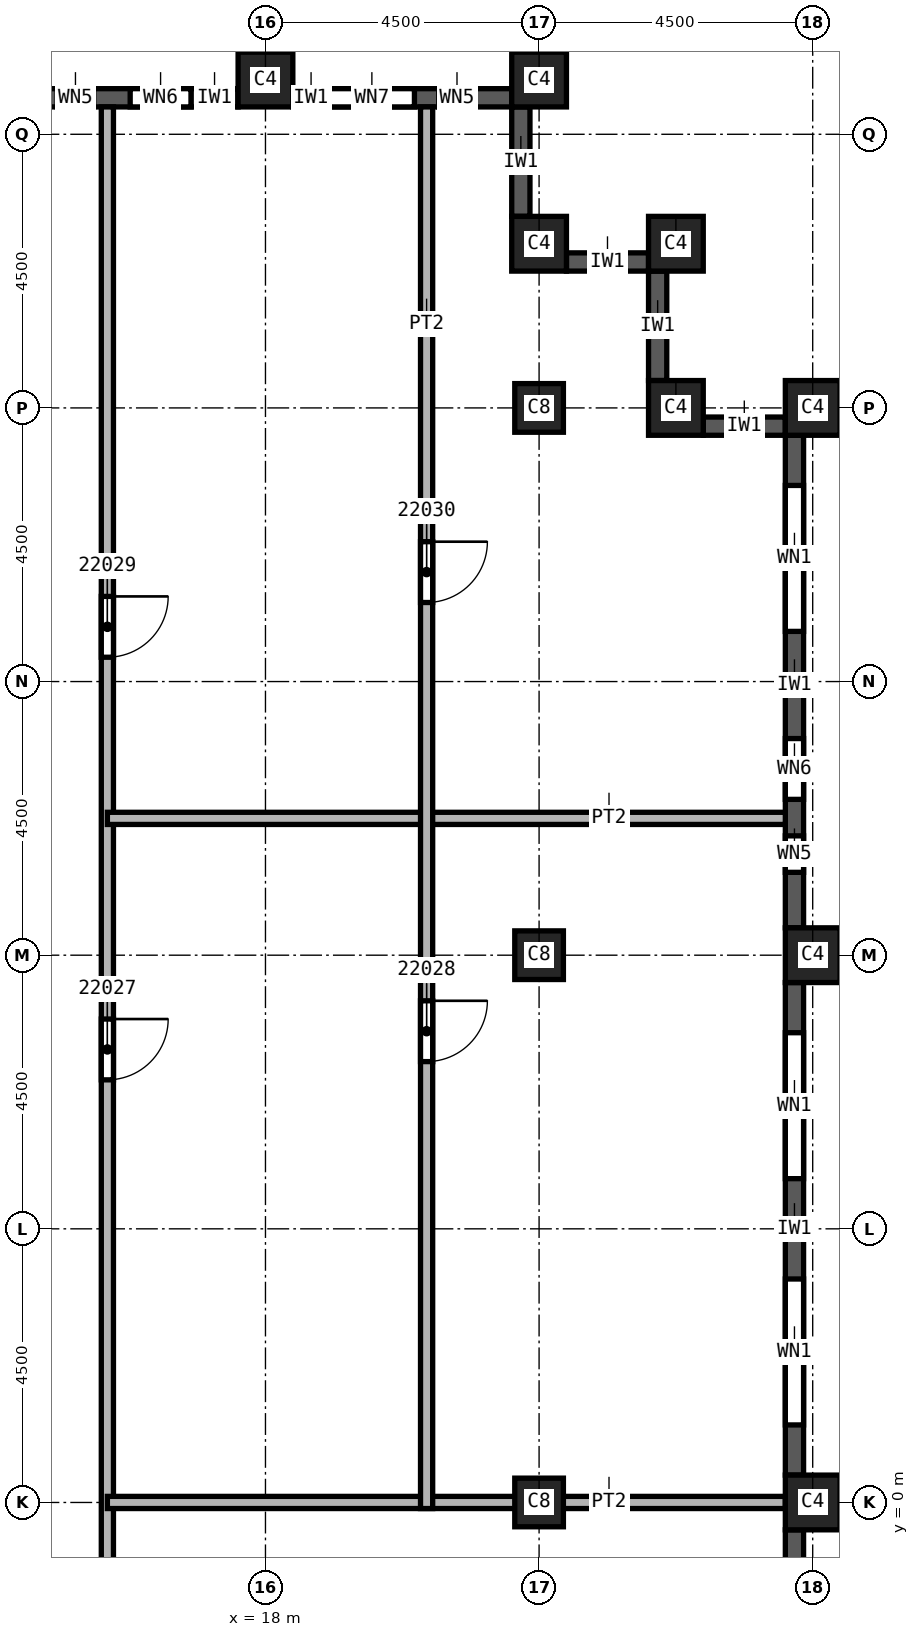
"""IFC4 building model, lengths in metres.
Left out: names, types, materials, properties, quantities, classifications, styles, units other than length and angle.
Written with IfcOpenShell. Run it as: python <this file> out.ifc"""

import sys

from ifc_helpers import new_model, si_unit, direction, frame, frame_2d, origin, origin_2d, place, context, subcontext, project, spatial, rectangle, extrude, element, fill, save


model = new_model("IFC4")
c1 = context("Model", 3, precision=1e-05, world=origin(), true_north=direction((0.0, 1.0)))
c2 = subcontext(c1, "Body", "Model", "MODEL_VIEW")
j1 = project(units=[si_unit("LENGTHUNIT", "METRE"), si_unit("PLANEANGLEUNIT", "RADIAN")], contexts=[c1])
p1 = place(None, origin())
s1 = spatial("IfcSite", under=j1, at=p1, CompositionType="ELEMENT")
p2 = place(p1, origin())
s2 = spatial("IfcBuilding", under=s1, at=p2, CompositionType="ELEMENT")
p3 = place(p2, frame((0.0, 0.0, 316.0)))
s3 = spatial("IfcBuildingStorey", under=s2, at=p3, CompositionType="ELEMENT", Elevation=316.0)
for number, where, z_axis, x_axis in (
    (1, (22.5, 0.0, 0.0), (0.0, 0.0, 1.0), (1.0, 0.0, 0.0)),
    (2, (22.5, 9.0, 0.0), (0.0, 0.0, 1.0), (1.0, 0.0, 0.0)),
    (3, (22.5, 18.0, 0.0), (0.0, 0.0, 1.0), (1.0, 0.0, 0.0)),
):
    element("IfcColumn", number, at=place(p3, frame(where, z_axis=z_axis, x_axis=x_axis)), inside=s3, PredefinedType="COLUMN", context=c2, shape_type="SweptSolid", body=[
        extrude(rectangle(XDim=0.8, YDim=0.8, at=origin_2d()), origin(), (0.0, 0.0, 1.0), 3.59),
    ])
for number, where, z_axis, x_axis in (
    (4, (27.0, 0.0, 0.0), (0.0, 0.0, 1.0), (0.0, 1.0, 0.0)),
    (5, (27.0, 9.0, 0.0), (0.0, 0.0, 1.0), (0.0, 1.0, 0.0)),
    (6, (27.0, 18.0, 0.0), (0.0, 0.0, 1.0), (0.0, 1.0, 0.0)),
    (7, (18.0, 23.4, 0.0), (0.0, 0.0, 1.0), (1.0, 0.0, 0.0)),
    (8, (22.5, 23.4, 0.0), (0.0, 0.0, 1.0), (1.0, 0.0, 0.0)),
    (9, (22.5, 20.7, 0.0), (0.0, 0.0, 1.0), (1.0, 0.0, 0.0)),
    (10, (24.75, 20.7, 0.0), (0.0, 0.0, 1.0), (1.0, 0.0, 0.0)),
    (11, (24.75, 18.0, 0.0), (0.0, 0.0, 1.0), (1.0, 0.0, 0.0)),
):
    element("IfcColumn", number, at=place(p3, frame(where, z_axis=z_axis, x_axis=x_axis)), inside=s3, PredefinedType="COLUMN", context=c2, shape_type="SweptSolid", body=[
        extrude(rectangle(XDim=0.9, YDim=0.9, at=origin_2d()), origin(), (0.0, 0.0, 1.0), 3.59),
    ])
p4 = place(p3, frame((26.7, -8.55, 0.0), z_axis=(0.0, 0.0, 1.0), x_axis=(0.0, 1.0, 0.0)))
e12 = element("IfcWall", 12, at=p4, inside=s3, PredefinedType="SOLIDWALL", context=c2, shape_type="SweptSolid", body=[
    extrude(rectangle(XDim=8.1, YDim=0.3, at=frame_2d((4.05, 0.0))), origin(), (0.0, 0.0, 1.0), 2.99),
])
p5 = place(p4, frame((0.825, 0.0, 0.8)))
e13 = element("IfcOpeningElement", 13, at=p5, cuts=e12, PredefinedType="OPENING", context=c2, shape_type="SweptSolid", body=[
    extrude(rectangle(XDim=2.4, YDim=1.95, at=frame_2d((1.2, 0.975))), frame((0.0, 0.15, 0.0), z_axis=(0.0, -1.0, 0.0), x_axis=(1.0, 0.0, 0.0)), (0.0, 0.0, 1.0), 0.3),
])
p6 = place(p4, frame((4.875, 0.0, 0.8)))
e14 = element("IfcOpeningElement", 14, at=p6, cuts=e12, PredefinedType="OPENING", context=c2, shape_type="SweptSolid", body=[
    extrude(rectangle(XDim=2.4, YDim=1.95, at=frame_2d((1.2, 0.975))), frame((0.0, 0.15, 0.0), z_axis=(0.0, -1.0, 0.0), x_axis=(1.0, 0.0, 0.0)), (0.0, 0.0, 1.0), 0.3),
])
p7 = place(p3, frame((26.7, 0.45, 0.0), z_axis=(0.0, 0.0, 1.0), x_axis=(0.0, 1.0, 0.0)))
e15 = element("IfcWall", 15, at=p7, inside=s3, PredefinedType="SOLIDWALL", context=c2, shape_type="SweptSolid", body=[
    extrude(rectangle(XDim=8.1, YDim=0.3, at=frame_2d((4.05, 0.0))), origin(), (0.0, 0.0, 1.0), 2.99),
])
p8 = place(p7, frame((0.825, 0.0, 0.8)))
e16 = element("IfcOpeningElement", 16, at=p8, cuts=e15, PredefinedType="OPENING", context=c2, shape_type="SweptSolid", body=[
    extrude(rectangle(XDim=2.4, YDim=1.95, at=frame_2d((1.2, 0.975))), frame((0.0, 0.15, 0.0), z_axis=(0.0, -1.0, 0.0), x_axis=(1.0, 0.0, 0.0)), (0.0, 0.0, 1.0), 0.3),
])
p9 = place(p7, frame((4.875, 0.0, 0.8)))
e17 = element("IfcOpeningElement", 17, at=p9, cuts=e15, PredefinedType="OPENING", context=c2, shape_type="SweptSolid", body=[
    extrude(rectangle(XDim=2.4, YDim=1.95, at=frame_2d((1.2, 0.975))), frame((0.0, 0.15, 0.0), z_axis=(0.0, -1.0, 0.0), x_axis=(1.0, 0.0, 0.0)), (0.0, 0.0, 1.0), 0.3),
])
p10 = place(p3, frame((26.7, 9.45, 0.0), z_axis=(0.0, 0.0, 1.0), x_axis=(0.0, 1.0, 0.0)))
e18 = element("IfcWall", 18, at=p10, inside=s3, PredefinedType="SOLIDWALL", context=c2, shape_type="SweptSolid", body=[
    extrude(rectangle(XDim=8.1, YDim=0.3, at=frame_2d((4.05, 0.0))), origin(), (0.0, 0.0, 1.0), 2.99),
])
p11 = place(p10, frame((4.875, 0.0, 0.8)))
e19 = element("IfcOpeningElement", 19, at=p11, cuts=e18, PredefinedType="OPENING", context=c2, shape_type="SweptSolid", body=[
    extrude(rectangle(XDim=2.4, YDim=1.95, at=frame_2d((1.2, 0.975))), frame((0.0, 0.15, 0.0), z_axis=(0.0, -1.0, 0.0), x_axis=(1.0, 0.0, 0.0)), (0.0, 0.0, 1.0), 0.3),
])
p12 = place(p10, frame((0.913, 0.0, 0.8)))
e20 = element("IfcOpeningElement", 20, at=p12, cuts=e18, PredefinedType="OPENING", context=c2, shape_type="SweptSolid", body=[
    extrude(rectangle(XDim=0.6, YDim=1.95, at=frame_2d((0.3, 0.975))), frame((0.0, 0.15, 0.0), z_axis=(0.0, -1.0, 0.0), x_axis=(1.0, 0.0, 0.0)), (0.0, 0.0, 1.0), 0.3),
])
p13 = place(p10, frame((2.113, 0.0, 0.8)))
e21 = element("IfcOpeningElement", 21, at=p13, cuts=e18, PredefinedType="OPENING", context=c2, shape_type="SweptSolid", body=[
    extrude(rectangle(XDim=1.0, YDim=1.95, at=frame_2d((0.5, 0.975))), frame((0.0, 0.15, 0.0), z_axis=(0.0, -1.0, 0.0), x_axis=(1.0, 0.0, 0.0)), (0.0, 0.0, 1.0), 0.3),
])
p14 = place(p3, frame((26.55, 17.7, 0.0), z_axis=(0.0, 0.0, 1.0), x_axis=(-1.0, 0.0, 0.0)))
e22 = element("IfcWall", 22, at=p14, inside=s3, PredefinedType="SOLIDWALL", context=c2, shape_type="SweptSolid", body=[
    extrude(rectangle(XDim=1.35, YDim=0.3, at=frame_2d((0.675, 0.0))), origin(), (0.0, 0.0, 1.0), 2.99),
])
p15 = place(p3, frame((24.45, 18.45, 0.0), z_axis=(0.0, 0.0, 1.0), x_axis=(0.0, 1.0, 0.0)))
e23 = element("IfcWall", 23, at=p15, inside=s3, PredefinedType="SOLIDWALL", context=c2, shape_type="SweptSolid", body=[
    extrude(rectangle(XDim=1.8, YDim=0.3, at=frame_2d((0.9, 0.0))), origin(), (0.0, 0.0, 1.0), 2.99),
])
p16 = place(p3, frame((24.3, 20.4, 0.0), z_axis=(0.0, 0.0, 1.0), x_axis=(-1.0, 0.0, 0.0)))
e24 = element("IfcWall", 24, at=p16, inside=s3, PredefinedType="SOLIDWALL", context=c2, shape_type="SweptSolid", body=[
    extrude(rectangle(XDim=1.35, YDim=0.3, at=frame_2d((0.675, 0.0))), origin(), (0.0, 0.0, 1.0), 2.99),
])
p17 = place(p3, frame((22.2, 21.15, 0.0), z_axis=(0.0, 0.0, 1.0), x_axis=(0.0, 1.0, 0.0)))
e25 = element("IfcWall", 25, at=p17, inside=s3, PredefinedType="SOLIDWALL", context=c2, shape_type="SweptSolid", body=[
    extrude(rectangle(XDim=1.8, YDim=0.3, at=frame_2d((0.9, 0.0))), origin(), (0.0, 0.0, 1.0), 2.99),
])
p18 = place(p3, frame((22.05, 23.1, 0.0), z_axis=(0.0, 0.0, 1.0), x_axis=(-1.0, 0.0, 0.0)))
e26 = element("IfcWall", 26, at=p18, inside=s3, PredefinedType="SOLIDWALL", context=c2, shape_type="SweptSolid", body=[
    extrude(rectangle(XDim=3.6, YDim=0.3, at=frame_2d((1.8, 0.0))), origin(), (0.0, 0.0, 1.0), 2.99),
])
p19 = place(p18, frame((0.6, 0.0, 0.8)))
e27 = element("IfcOpeningElement", 27, at=p19, cuts=e26, PredefinedType="OPENING", context=c2, shape_type="SweptSolid", body=[
    extrude(rectangle(XDim=0.6, YDim=1.95, at=frame_2d((0.3, 0.975))), frame((0.0, 0.15, 0.0), z_axis=(0.0, -1.0, 0.0), x_axis=(1.0, 0.0, 0.0)), (0.0, 0.0, 1.0), 0.3),
])
p20 = place(p18, frame((1.6, 0.0, 0.8)))
e28 = element("IfcOpeningElement", 28, at=p20, cuts=e26, PredefinedType="OPENING", context=c2, shape_type="SweptSolid", body=[
    extrude(rectangle(XDim=1.4, YDim=1.95, at=frame_2d((0.7, 0.975))), frame((0.0, 0.15, 0.0), z_axis=(0.0, -1.0, 0.0), x_axis=(1.0, 0.0, 0.0)), (0.0, 0.0, 1.0), 0.3),
])
p21 = place(p3, frame((17.55, 23.1, 0.0), z_axis=(0.0, 0.0, 1.0), x_axis=(-1.0, 0.0, 0.0)))
e29 = element("IfcWall", 29, at=p21, inside=s3, PredefinedType="SOLIDWALL", context=c2, shape_type="SweptSolid", body=[
    extrude(rectangle(XDim=3.6, YDim=0.3, at=frame_2d((1.8, 0.0))), origin(), (0.0, 0.0, 1.0), 2.99),
])
p22 = place(p21, frame((0.775, 0.0, 0.8)))
e30 = element("IfcOpeningElement", 30, at=p22, cuts=e29, PredefinedType="OPENING", context=c2, shape_type="SweptSolid", body=[
    extrude(rectangle(XDim=1.0, YDim=1.95, at=frame_2d((0.5, 0.975))), frame((0.0, 0.15, 0.0), z_axis=(0.0, -1.0, 0.0), x_axis=(1.0, 0.0, 0.0)), (0.0, 0.0, 1.0), 0.3),
])
p23 = place(p21, frame((2.375, 0.0, 0.8)))
e31 = element("IfcOpeningElement", 31, at=p23, cuts=e29, PredefinedType="OPENING", context=c2, shape_type="SweptSolid", body=[
    extrude(rectangle(XDim=0.6, YDim=1.95, at=frame_2d((0.3, 0.975))), frame((0.0, 0.15, 0.0), z_axis=(0.0, -1.0, 0.0), x_axis=(1.0, 0.0, 0.0)), (0.0, 0.0, 1.0), 0.3),
])
p24 = place(p3, frame((15.4, 22.95, 0.0), z_axis=(0.0, 0.0, 1.0), x_axis=(0.0, -1.0, 0.0)))
e32 = element("IfcWall", 32, at=p24, inside=s3, PredefinedType="PARTITIONING", context=c2, shape_type="SweptSolid", body=[
    extrude(rectangle(XDim=45.9, YDim=0.2, at=frame_2d((22.95, 0.0))), origin(), (0.0, 0.0, 1.0), 3.59),
])
p25 = place(p24, frame((15.0, 0.0, 0.0)))
e33 = element("IfcOpeningElement", 33, at=p25, cuts=e32, PredefinedType="OPENING", context=c2, shape_type="SweptSolid", body=[
    extrude(rectangle(XDim=1.0, YDim=2.1, at=frame_2d((0.5, 1.05))), frame((0.0, 0.1, 0.0), z_axis=(0.0, -1.0, 0.0), x_axis=(1.0, 0.0, 0.0)), (0.0, 0.0, 1.0), 0.2),
])
p26 = place(p24, frame((8.05, 0.0, 0.0)))
e34 = element("IfcOpeningElement", 34, at=p26, cuts=e32, PredefinedType="OPENING", context=c2, shape_type="SweptSolid", body=[
    extrude(rectangle(XDim=1.0, YDim=2.1, at=frame_2d((0.5, 1.05))), frame((0.0, 0.1, 0.0), z_axis=(0.0, -1.0, 0.0), x_axis=(1.0, 0.0, 0.0)), (0.0, 0.0, 1.0), 0.2),
])
p27 = place(p24, frame((43.8, 0.0, 0.0)))
e35 = element("IfcOpeningElement", 35, at=p27, cuts=e32, PredefinedType="OPENING", context=c2, shape_type="SweptSolid", body=[
    extrude(rectangle(XDim=1.0, YDim=2.1, at=frame_2d((0.5, 1.05))), frame((0.0, 0.1, 0.0), z_axis=(0.0, -1.0, 0.0), x_axis=(1.0, 0.0, 0.0)), (0.0, 0.0, 1.0), 0.2),
])
p28 = place(p24, frame((30.3, 0.0, 0.0)))
e36 = element("IfcOpeningElement", 36, at=p28, cuts=e32, PredefinedType="OPENING", context=c2, shape_type="SweptSolid", body=[
    extrude(rectangle(XDim=1.0, YDim=2.1, at=frame_2d((0.5, 1.05))), frame((0.0, 0.1, 0.0), z_axis=(0.0, -1.0, 0.0), x_axis=(1.0, 0.0, 0.0)), (0.0, 0.0, 1.0), 0.2),
])
for number, where, z_axis, x_axis in (
    (37, (15.4, 11.25, 0.0), (0.0, 0.0, 1.0), (1.0, 0.0, 0.0)),
    (38, (26.55, 0.0, 0.0), (0.0, 0.0, 1.0), (-1.0, 0.0, 0.0)),
):
    element("IfcWall", number, at=place(p3, frame(where, z_axis=z_axis, x_axis=x_axis)), inside=s3, PredefinedType="PARTITIONING", context=c2, shape_type="SweptSolid", body=[
        extrude(rectangle(XDim=11.15, YDim=0.2, at=frame_2d((5.575, 0.0))), origin(), (0.0, 0.0, 1.0), 3.59),
    ])
p29 = place(p3, frame((20.65, 22.95, 0.0), z_axis=(0.0, 0.0, 1.0), x_axis=(0.0, -1.0, 0.0)))
e39 = element("IfcWall", 39, at=p29, inside=s3, PredefinedType="PARTITIONING", context=c2, shape_type="SweptSolid", body=[
    extrude(rectangle(XDim=23.05, YDim=0.2, at=frame_2d((11.525, 0.0))), origin(), (0.0, 0.0, 1.0), 3.59),
])
p30 = place(p29, frame((14.7, 0.0, 0.0)))
e40 = element("IfcOpeningElement", 40, at=p30, cuts=e39, PredefinedType="OPENING", context=c2, shape_type="SweptSolid", body=[
    extrude(rectangle(XDim=1.0, YDim=2.1, at=frame_2d((0.5, 1.05))), frame((0.0, 0.1, 0.0), z_axis=(0.0, -1.0, 0.0), x_axis=(1.0, 0.0, 0.0)), (0.0, 0.0, 1.0), 0.2),
])
p31 = place(p29, frame((7.15, 0.0, 0.0)))
e41 = element("IfcOpeningElement", 41, at=p31, cuts=e39, PredefinedType="OPENING", context=c2, shape_type="SweptSolid", body=[
    extrude(rectangle(XDim=1.0, YDim=2.1, at=frame_2d((0.5, 1.05))), frame((0.0, 0.1, 0.0), z_axis=(0.0, -1.0, 0.0), x_axis=(1.0, 0.0, 0.0)), (0.0, 0.0, 1.0), 0.2),
])
p32 = place(p8, origin())
e42 = element("IfcWindow", 42, at=p32, inside=s3, PartitioningType="SINGLE_PANEL", PredefinedType="WINDOW", context=c2, shape_type="SweptSolid", body=[
    extrude(rectangle(XDim=2.4, YDim=1.95, at=frame_2d((1.2, 0.975))), frame((0.0, 0.03, 0.0), z_axis=(0.0, -1.0, 0.0), x_axis=(1.0, 0.0, 0.0)), (0.0, 0.0, 1.0), 0.06),
])
fill(e16, e42)
p33 = place(p9, origin())
e43 = element("IfcWindow", 43, at=p33, inside=s3, PartitioningType="SINGLE_PANEL", PredefinedType="WINDOW", context=c2, shape_type="SweptSolid", body=[
    extrude(rectangle(XDim=2.4, YDim=1.95, at=frame_2d((1.2, 0.975))), frame((0.0, 0.03, 0.0), z_axis=(0.0, -1.0, 0.0), x_axis=(1.0, 0.0, 0.0)), (0.0, 0.0, 1.0), 0.06),
])
fill(e17, e43)
p34 = place(p11, origin())
e44 = element("IfcWindow", 44, at=p34, inside=s3, PartitioningType="SINGLE_PANEL", PredefinedType="WINDOW", context=c2, shape_type="SweptSolid", body=[
    extrude(rectangle(XDim=2.4, YDim=1.95, at=frame_2d((1.2, 0.975))), frame((0.0, 0.03, 0.0), z_axis=(0.0, -1.0, 0.0), x_axis=(1.0, 0.0, 0.0)), (0.0, 0.0, 1.0), 0.06),
])
fill(e19, e44)
p35 = place(p25, origin())
e45 = element("IfcDoor", 45, at=p35, inside=s3, OperationType="SINGLE_SWING_RIGHT", PredefinedType="DOOR", context=c2, shape_type="SweptSolid", body=[
    extrude(rectangle(XDim=1.0, YDim=2.1, at=frame_2d((0.5, 1.05))), frame((0.0, 0.025, 0.0), z_axis=(0.0, -1.0, 0.0), x_axis=(1.0, 0.0, 0.0)), (0.0, 0.0, 1.0), 0.05),
])
fill(e33, e45)
p36 = place(p30, origin())
e46 = element("IfcDoor", 46, at=p36, inside=s3, OperationType="SINGLE_SWING_LEFT", PredefinedType="DOOR", context=c2, shape_type="SweptSolid", body=[
    extrude(rectangle(XDim=1.0, YDim=2.1, at=frame_2d((0.5, 1.05))), frame((0.0, 0.025, 0.0), z_axis=(0.0, -1.0, 0.0), x_axis=(1.0, 0.0, 0.0)), (0.0, 0.0, 1.0), 0.05),
])
fill(e40, e46)
p37 = place(p26, origin())
e47 = element("IfcDoor", 47, at=p37, inside=s3, OperationType="SINGLE_SWING_RIGHT", PredefinedType="DOOR", context=c2, shape_type="SweptSolid", body=[
    extrude(rectangle(XDim=1.0, YDim=2.1, at=frame_2d((0.5, 1.05))), frame((0.0, 0.025, 0.0), z_axis=(0.0, -1.0, 0.0), x_axis=(1.0, 0.0, 0.0)), (0.0, 0.0, 1.0), 0.05),
])
fill(e34, e47)
p38 = place(p31, origin())
e48 = element("IfcDoor", 48, at=p38, inside=s3, OperationType="SINGLE_SWING_LEFT", PredefinedType="DOOR", context=c2, shape_type="SweptSolid", body=[
    extrude(rectangle(XDim=1.0, YDim=2.1, at=frame_2d((0.5, 1.05))), frame((0.0, 0.025, 0.0), z_axis=(0.0, -1.0, 0.0), x_axis=(1.0, 0.0, 0.0)), (0.0, 0.0, 1.0), 0.05),
])
fill(e41, e48)
p39 = place(p12, origin())
e49 = element("IfcWindow", 49, at=p39, inside=s3, PartitioningType="SINGLE_PANEL", PredefinedType="WINDOW", context=c2, shape_type="SweptSolid", body=[
    extrude(rectangle(XDim=0.6, YDim=1.95, at=frame_2d((0.3, 0.975))), frame((0.0, 0.03, 0.0), z_axis=(0.0, -1.0, 0.0), x_axis=(1.0, 0.0, 0.0)), (0.0, 0.0, 1.0), 0.06),
])
fill(e20, e49)
p40 = place(p13, origin())
e50 = element("IfcWindow", 50, at=p40, inside=s3, PartitioningType="SINGLE_PANEL", PredefinedType="WINDOW", context=c2, shape_type="SweptSolid", body=[
    extrude(rectangle(XDim=1.0, YDim=1.95, at=frame_2d((0.5, 0.975))), frame((0.0, 0.03, 0.0), z_axis=(0.0, -1.0, 0.0), x_axis=(1.0, 0.0, 0.0)), (0.0, 0.0, 1.0), 0.06),
])
fill(e21, e50)
p41 = place(p19, origin())
e51 = element("IfcWindow", 51, at=p41, inside=s3, PartitioningType="SINGLE_PANEL", PredefinedType="WINDOW", context=c2, shape_type="SweptSolid", body=[
    extrude(rectangle(XDim=0.6, YDim=1.95, at=frame_2d((0.3, 0.975))), frame((0.0, 0.03, 0.0), z_axis=(0.0, -1.0, 0.0), x_axis=(1.0, 0.0, 0.0)), (0.0, 0.0, 1.0), 0.06),
])
fill(e27, e51)
p42 = place(p20, origin())
e52 = element("IfcWindow", 52, at=p42, inside=s3, PartitioningType="SINGLE_PANEL", PredefinedType="WINDOW", context=c2, shape_type="SweptSolid", body=[
    extrude(rectangle(XDim=1.4, YDim=1.95, at=frame_2d((0.7, 0.975))), frame((0.0, 0.03, 0.0), z_axis=(0.0, -1.0, 0.0), x_axis=(1.0, 0.0, 0.0)), (0.0, 0.0, 1.0), 0.06),
])
fill(e28, e52)
p43 = place(p22, origin())
e53 = element("IfcWindow", 53, at=p43, inside=s3, PartitioningType="SINGLE_PANEL", PredefinedType="WINDOW", context=c2, shape_type="SweptSolid", body=[
    extrude(rectangle(XDim=1.0, YDim=1.95, at=frame_2d((0.5, 0.975))), frame((0.0, 0.03, 0.0), z_axis=(0.0, -1.0, 0.0), x_axis=(1.0, 0.0, 0.0)), (0.0, 0.0, 1.0), 0.06),
])
fill(e30, e53)
p44 = place(p23, origin())
e54 = element("IfcWindow", 54, at=p44, inside=s3, PartitioningType="SINGLE_PANEL", PredefinedType="WINDOW", context=c2, shape_type="SweptSolid", body=[
    extrude(rectangle(XDim=0.6, YDim=1.95, at=frame_2d((0.3, 0.975))), frame((0.0, 0.03, 0.0), z_axis=(0.0, -1.0, 0.0), x_axis=(1.0, 0.0, 0.0)), (0.0, 0.0, 1.0), 0.06),
])
fill(e31, e54)
save(model, sys.argv[1])
